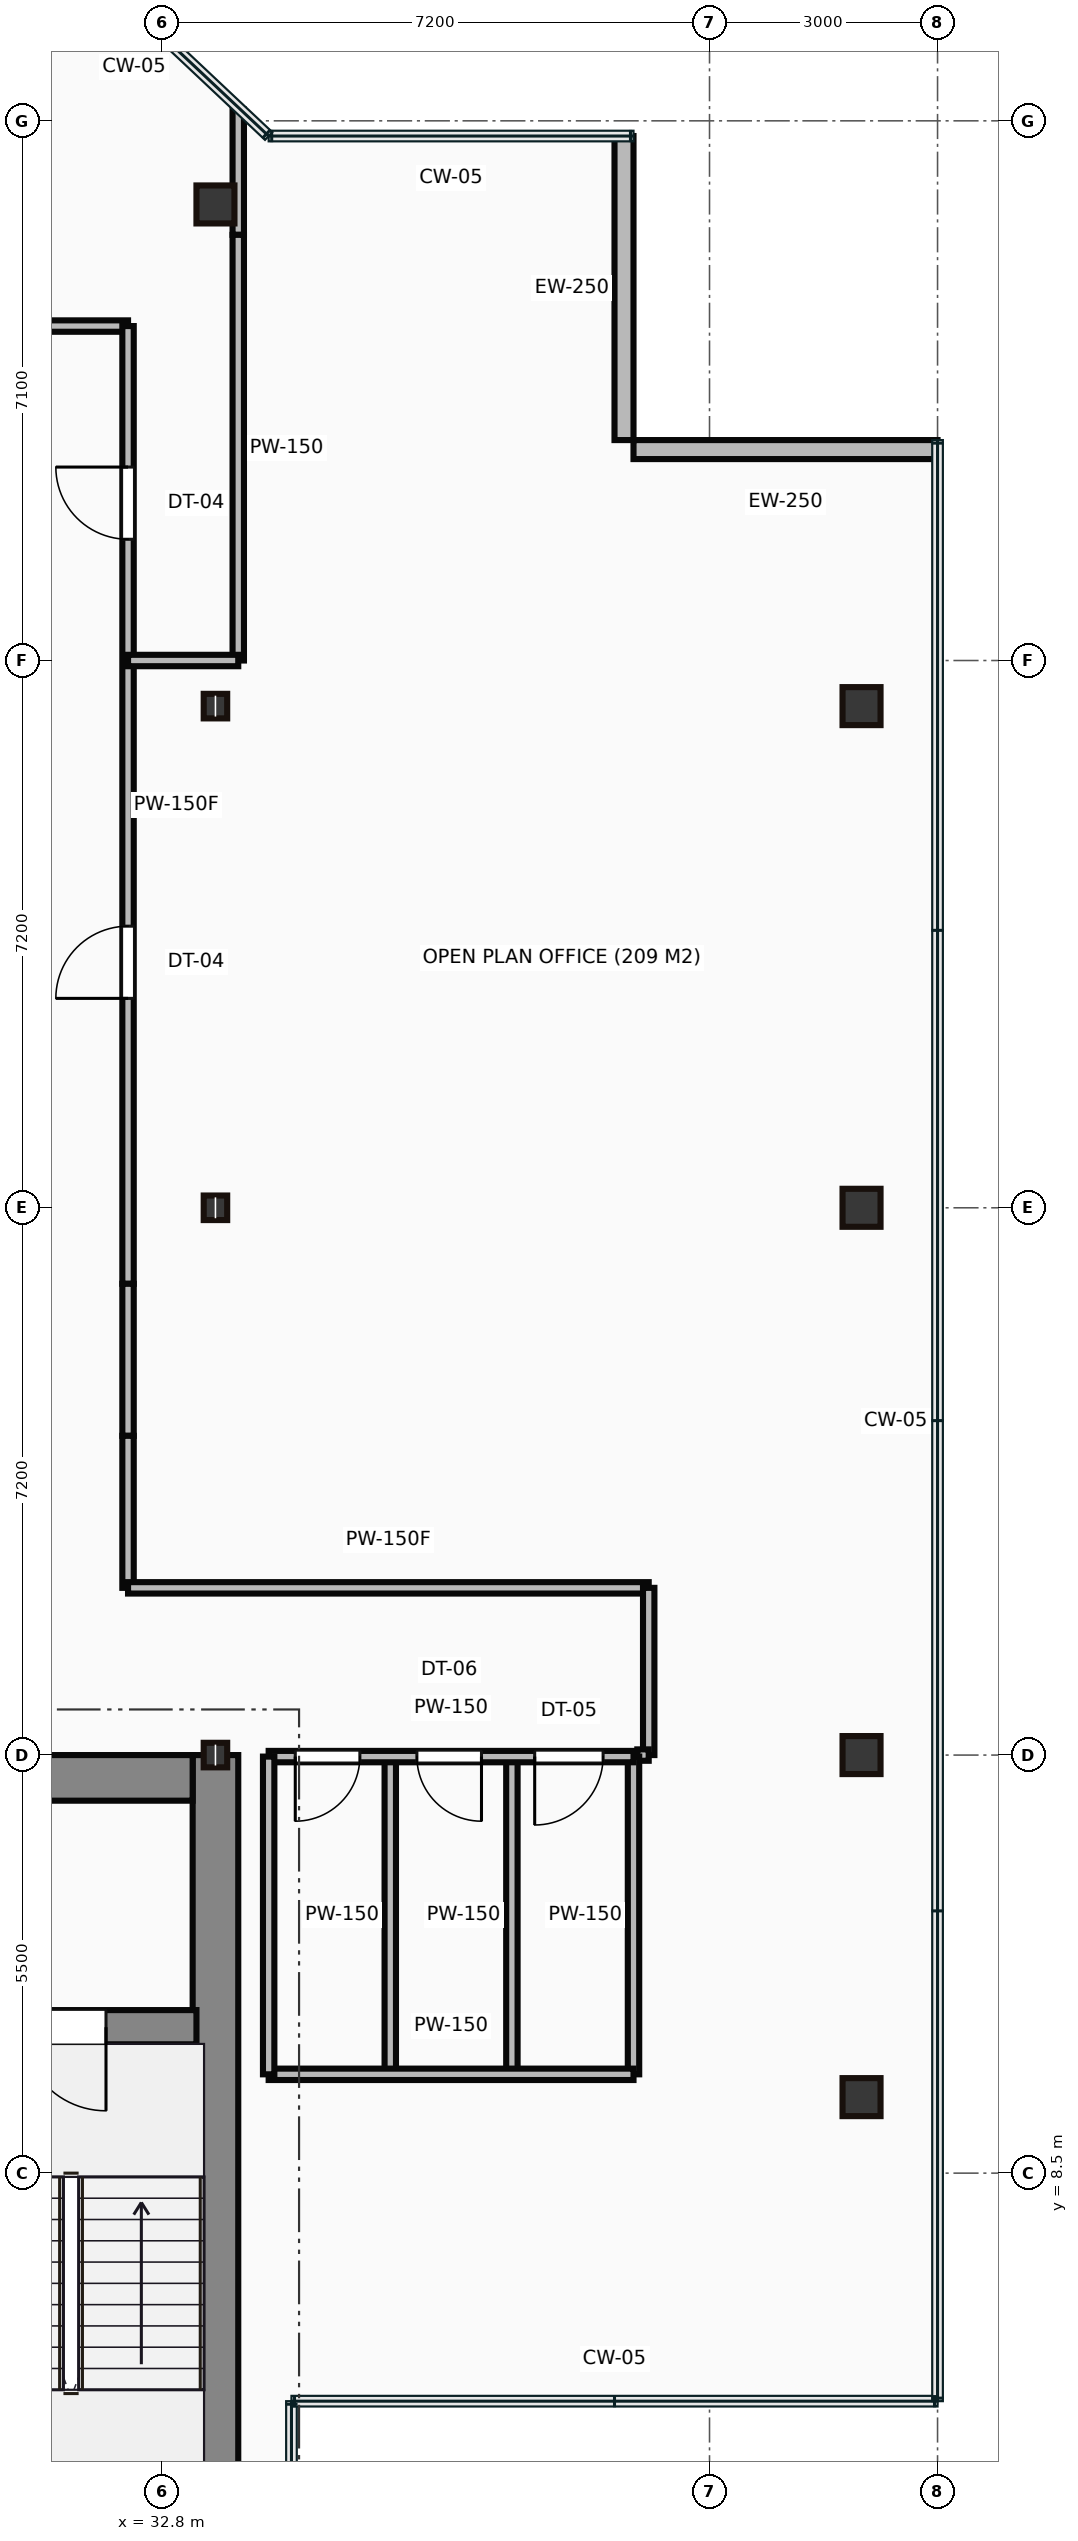
"""IFC4 building model, lengths in metres.
Left out: names, types, materials, properties, quantities, classifications, styles, units other than length and angle.
Written with IfcOpenShell. Run it as: python <this file> out.ifc"""

import sys

from ifc_helpers import new_model, si_unit, direction, frame, frame_2d, origin, origin_2d, place, context, subcontext, project, spatial, rectangle, hollow_rectangle, i_section, extrude, source, transform, mapped, element, fill, save


model = new_model("IFC4")
c1 = context("Model", 3, precision=1e-05, world=origin(), true_north=direction((0.0, 1.0)))
c2 = subcontext(c1, "Body", "Model", "MODEL_VIEW")
j1 = project(units=[si_unit("LENGTHUNIT", "METRE"), si_unit("PLANEANGLEUNIT", "RADIAN")], contexts=[c1])
p1 = place(None, origin())
s1 = spatial("IfcSite", under=j1, at=p1, CompositionType="ELEMENT")
p2 = place(p1, origin())
s2 = spatial("IfcBuilding", under=s1, at=p2, CompositionType="ELEMENT")
p3 = place(p2, frame((0.0, 0.0, 240.55)))
s3 = spatial("IfcBuildingStorey", under=s2, at=p3, CompositionType="ELEMENT", Elevation=240.55)
m1 = source(origin(), c2, "Body", "SweptSolid", [
    extrude(rectangle(XDim=13.1, YDim=0.6, at=frame_2d((6.55, 0.0))), origin(), (0.0, 0.0, 1.0), 3.65),
])
p4 = place(p3, frame((33.5, 0.9, 0.0), z_axis=(0.0, 0.0, 1.0), x_axis=(0.0, 1.0, 0.0)))
e1 = element("IfcWall", 1, at=p4, inside=s3, PredefinedType="SHEAR", context=c2, shape_type="MappedRepresentation", body=[
    mapped(m1, transform((0.0, 0.0, 0.0))),
])
m2 = source(origin(), c2, "Body", "SweptSolid", [
    extrude(rectangle(XDim=12.6, YDim=0.6, at=frame_2d((6.3, 0.0))), origin(), (0.0, 0.0, 1.0), 3.65),
])
p5 = place(p3, frame((20.6, 13.7, 0.0), z_axis=(0.0, 0.0, 1.0), x_axis=(1.0, 0.0, 0.0)))
e2 = element("IfcWall", 2, at=p5, inside=s3, PredefinedType="SHEAR", context=c2, shape_type="MappedRepresentation", body=[
    mapped(m2, transform((0.0, 0.0, 0.0))),
])
p6 = place(p5, frame((9.25, 0.0, 0.0)))
e3 = element("IfcOpeningElement", 3, at=p6, cuts=e2, PredefinedType="OPENING", context=c2, shape_type="SweptSolid", body=[
    extrude(rectangle(XDim=1.1, YDim=2.15, at=frame_2d((0.55, 1.075))), frame((0.0, 0.31, 0.0), z_axis=(0.0, -1.0, 0.0), x_axis=(1.0, 0.0, 0.0)), (0.0, 0.0, 1.0), 0.62),
])
m3 = source(origin(), c2, "Body", "SweptSolid", [
    extrude(rectangle(XDim=3.39, YDim=0.45, at=frame_2d((1.695, 0.0))), origin(), (0.0, 0.0, 1.0), 3.65),
])
p7 = place(p3, frame((29.86, 10.42, 0.0), z_axis=(0.0, 0.0, 1.0), x_axis=(1.0, 0.0, 0.0)))
e4 = element("IfcWall", 4, at=p7, inside=s3, PredefinedType="SHEAR", context=c2, shape_type="MappedRepresentation", body=[
    mapped(m3, transform((0.0, 0.0, 0.0))),
])
p8 = place(p7, frame((1.1, 0.0, 0.0)))
e5 = element("IfcOpeningElement", 5, at=p8, cuts=e4, PredefinedType="OPENING", context=c2, shape_type="SweptSolid", body=[
    extrude(rectangle(XDim=1.1, YDim=2.15, at=frame_2d((0.55, 1.075))), frame((0.0, 0.235, 0.0), z_axis=(0.0, -1.0, 0.0), x_axis=(1.0, 0.0, 0.0)), (0.0, 0.0, 1.0), 0.47),
])
m4 = source(origin(), c2, "Body", "SweptSolid", [
    extrude(i_section(OverallWidth=0.309, OverallDepth=0.323, WebThickness=0.014, FlangeThickness=0.023, at=origin_2d()), origin(), (0.0, 0.0, 1.0), 3.65),
])
for number, where, z_axis, x_axis in (
    (6, (33.5, 14.0, 0.0), (0.0, 0.0, 1.0), (1.0, 0.0, 0.0)),
    (7, (33.5, 21.2, 0.0), (0.0, 0.0, 1.0), (1.0, 0.0, 0.0)),
    (8, (33.5, 27.8, 0.0), (0.0, 0.0, 1.0), (1.0, 0.0, 0.0)),
):
    element("IfcColumn", number, at=place(p3, frame(where, z_axis=z_axis, x_axis=x_axis)), inside=s3, PredefinedType="COLUMN", context=c2, shape_type="MappedRepresentation", body=[
        mapped(m4, transform((0.0, 0.0, 0.0))),
    ])
m5 = source(origin(), c2, "Body", "SweptSolid", [
    extrude(hollow_rectangle(XDim=0.5, YDim=0.5, WallThickness=0.022, at=origin_2d()), origin(), (0.0, 0.0, 1.0), 3.65),
])
for number, where, z_axis, x_axis in (
    (9, (33.5, 34.4, 0.0), (0.0, 0.0, 1.0), (1.0, 0.0, 0.0)),
    (10, (42.0, 9.5, 0.0), (0.0, 0.0, 1.0), (1.0, 0.0, 0.0)),
    (11, (42.0, 14.0, 0.0), (0.0, 0.0, 1.0), (1.0, 0.0, 0.0)),
    (12, (42.0, 21.2, 0.0), (0.0, 0.0, 1.0), (1.0, 0.0, 0.0)),
    (13, (42.0, 27.8, 0.0), (0.0, 0.0, 1.0), (1.0, 0.0, 0.0)),
):
    element("IfcColumn", number, at=place(p3, frame(where, z_axis=z_axis, x_axis=x_axis)), inside=s3, PredefinedType="COLUMN", context=c2, shape_type="MappedRepresentation", body=[
        mapped(m5, transform((0.0, 0.0, 0.0))),
    ])
m6 = source(origin(), c2, "Body", "SweptSolid", [
    extrude(rectangle(XDim=4.0, YDim=0.25, at=frame_2d((2.0, 0.0))), origin(), (0.0, 0.0, 1.0), 3.4),
])
for number, where, z_axis, x_axis in (
    (14, (43.0, 31.175, 0.0), (0.0, 0.0, 1.0), (-1.0, 0.0, 0.0)),
    (15, (38.875, 31.3, 0.0), (0.0, 0.0, 1.0), (0.0, 1.0, 0.0)),
):
    element("IfcWall", number, at=place(p3, frame(where, z_axis=z_axis, x_axis=x_axis)), inside=s3, PredefinedType="STANDARD", context=c2, shape_type="MappedRepresentation", body=[
        mapped(m6, transform((0.0, 0.0, 0.0))),
    ])
m7 = source(origin(), c2, "Body", "SweptSolid", [
    extrude(rectangle(XDim=4.8, YDim=0.15, at=frame_2d((2.4, 0.0))), origin(), (0.0, 0.0, 1.0), 2.787),
])
p9 = place(p3, frame((34.2, 13.98, 0.0), z_axis=(0.0, 0.0, 1.0), x_axis=(1.0, 0.0, 0.0)))
e16 = element("IfcWall", 16, at=p9, inside=s3, PredefinedType="PARTITIONING", context=c2, shape_type="MappedRepresentation", body=[
    mapped(m7, transform((0.0, 0.0, 0.0))),
])
p10 = place(p9, frame((0.35, 0.0, 0.0)))
e17 = element("IfcOpeningElement", 17, at=p10, cuts=e16, PredefinedType="OPENING", context=c2, shape_type="SweptSolid", body=[
    extrude(rectangle(XDim=0.85, YDim=2.1, at=frame_2d((0.425, 1.05))), frame((0.0, 0.085, 0.0), z_axis=(0.0, -1.0, 0.0), x_axis=(1.0, 0.0, 0.0)), (0.0, 0.0, 1.0), 0.17),
])
p11 = place(p9, frame((1.95, 0.0, 0.0)))
e18 = element("IfcOpeningElement", 18, at=p11, cuts=e16, PredefinedType="OPENING", context=c2, shape_type="SweptSolid", body=[
    extrude(rectangle(XDim=0.85, YDim=2.1, at=frame_2d((0.425, 1.05))), frame((0.0, 0.085, 0.0), z_axis=(0.0, -1.0, 0.0), x_axis=(1.0, 0.0, 0.0)), (0.0, 0.0, 1.0), 0.17),
])
p12 = place(p9, frame((3.5, 0.0, 0.0)))
e19 = element("IfcOpeningElement", 19, at=p12, cuts=e16, PredefinedType="OPENING", context=c2, shape_type="SweptSolid", body=[
    extrude(rectangle(XDim=0.9, YDim=2.1, at=frame_2d((0.45, 1.05))), frame((0.0, 0.085, 0.0), z_axis=(0.0, -1.0, 0.0), x_axis=(1.0, 0.0, 0.0)), (0.0, 0.0, 1.0), 0.17),
])
m8 = source(origin(), c2, "Body", "SweptSolid", [
    extrude(rectangle(XDim=4.8, YDim=0.15, at=frame_2d((2.4, 0.0))), origin(), (0.0, 0.0, 1.0), 3.4),
])
p13 = place(p3, frame((34.2, 9.8, 0.0), z_axis=(0.0, 0.0, 1.0), x_axis=(1.0, 0.0, 0.0)))
e20 = element("IfcWall", 20, at=p13, inside=s3, PredefinedType="PARTITIONING", context=c2, shape_type="MappedRepresentation", body=[
    mapped(m8, transform((0.0, 0.0, 0.0))),
])
m9 = source(origin(), c2, "Body", "SweptSolid", [
    extrude(rectangle(XDim=4.18, YDim=0.15, at=frame_2d((2.09, 0.0))), origin(), (0.0, 0.0, 1.0), 3.4),
])
for number, where, z_axis, x_axis in (
    (21, (39.0, 9.8, 0.0), (0.0, 0.0, 1.0), (0.0, 1.0, 0.0)),
    (22, (34.2, 9.8, 0.0), (0.0, 0.0, 1.0), (0.0, 1.0, 0.0)),
    (23, (35.8, 9.8, 0.0), (0.0, 0.0, 1.0), (0.0, 1.0, 0.0)),
    (24, (37.4, 9.8, 0.0), (0.0, 0.0, 1.0), (0.0, 1.0, 0.0)),
):
    element("IfcWall", number, at=place(p3, frame(where, z_axis=z_axis, x_axis=x_axis)), inside=s3, PredefinedType="PARTITIONING", context=c2, shape_type="MappedRepresentation", body=[
        mapped(m9, transform((0.0, 0.0, 0.0))),
    ])
m10 = source(origin(), c2, "Body", "SweptSolid", [
    extrude(rectangle(XDim=2.15, YDim=0.15, at=frame_2d((1.075, 0.0))), origin(), (0.0, 0.0, 1.0), 3.4),
])
p14 = place(p3, frame((30.2, 32.8, 0.0), z_axis=(0.0, 0.0, 1.0), x_axis=(1.0, 0.0, 0.0)))
e25 = element("IfcWall", 25, at=p14, inside=s3, PredefinedType="PARTITIONING", context=c2, shape_type="MappedRepresentation", body=[
    mapped(m10, transform((0.0, 0.0, 0.0))),
])
m11 = source(origin(), c2, "Body", "SweptSolid", [
    extrude(rectangle(XDim=12.6, YDim=0.15, at=frame_2d((6.3, 0.0))), origin(), (0.0, 0.0, 1.0), 3.4),
])
p15 = place(p3, frame((32.35, 32.8, 0.0), z_axis=(0.0, 0.0, 1.0), x_axis=(0.0, -1.0, 0.0)))
e26 = element("IfcWall", 26, at=p15, inside=s3, PredefinedType="PARTITIONING", context=c2, shape_type="MappedRepresentation", body=[
    mapped(m11, transform((0.0, 0.0, 0.0))),
])
p16 = place(p15, frame((1.855, 0.0, 0.0)))
e27 = element("IfcOpeningElement", 27, at=p16, cuts=e26, PredefinedType="OPENING", context=c2, shape_type="SweptSolid", body=[
    extrude(rectangle(XDim=0.95, YDim=2.15, at=frame_2d((0.475, 1.075))), frame((0.0, 0.085, 0.0), z_axis=(0.0, -1.0, 0.0), x_axis=(1.0, 0.0, 0.0)), (0.0, 0.0, 1.0), 0.17),
])
p17 = place(p15, frame((7.895, 0.0, 0.0)))
e28 = element("IfcOpeningElement", 28, at=p17, cuts=e26, PredefinedType="OPENING", context=c2, shape_type="SweptSolid", body=[
    extrude(rectangle(XDim=0.95, YDim=2.15, at=frame_2d((0.475, 1.075))), frame((0.0, 0.085, 0.0), z_axis=(0.0, -1.0, 0.0), x_axis=(1.0, 0.0, 0.0)), (0.0, 0.0, 1.0), 0.17),
])
m12 = source(origin(), c2, "Body", "SweptSolid", [
    extrude(rectangle(XDim=2.0, YDim=0.15, at=frame_2d((1.0, 0.0))), origin(), (0.0, 0.0, 1.0), 3.4),
])
for number, where, z_axis, x_axis in (
    (29, (32.35, 20.2, 0.0), (0.0, 0.0, 1.0), (0.0, -1.0, 0.0)),
    (30, (32.35, 18.2, 0.0), (0.0, 0.0, 1.0), (0.0, -1.0, 0.0)),
):
    element("IfcWall", number, at=place(p3, frame(where, z_axis=z_axis, x_axis=x_axis)), inside=s3, PredefinedType="PARTITIONING", context=c2, shape_type="MappedRepresentation", body=[
        mapped(m12, transform((0.0, 0.0, 0.0))),
    ])
m13 = source(origin(), c2, "Body", "SweptSolid", [
    extrude(rectangle(XDim=6.85, YDim=0.15, at=frame_2d((3.425, 0.0))), origin(), (0.0, 0.0, 1.0), 3.4),
])
p18 = place(p3, frame((32.35, 16.2, 0.0), z_axis=(0.0, 0.0, 1.0), x_axis=(1.0, 0.0, 0.0)))
e31 = element("IfcWall", 31, at=p18, inside=s3, PredefinedType="PARTITIONING", context=c2, shape_type="MappedRepresentation", body=[
    mapped(m13, transform((0.0, 0.0, 0.0))),
])
m14 = source(origin(), c2, "Body", "SweptSolid", [
    extrude(rectangle(XDim=2.2, YDim=0.15, at=frame_2d((1.1, 0.0))), origin(), (0.0, 0.0, 1.0), 3.4),
])
p19 = place(p3, frame((39.2, 16.2, 0.0), z_axis=(0.0, 0.0, 1.0), x_axis=(0.0, -1.0, 0.0)))
e32 = element("IfcWall", 32, at=p19, inside=s3, PredefinedType="PARTITIONING", context=c2, shape_type="MappedRepresentation", body=[
    mapped(m14, transform((0.0, 0.0, 0.0))),
])
m15 = source(origin(), c2, "Body", "SweptSolid", [
    extrude(rectangle(XDim=0.15, YDim=0.15, at=frame_2d((0.075, 0.0))), origin(), (0.0, 0.0, 1.0), 3.4),
])
p20 = place(p3, frame((39.2, 14.0, 0.0), z_axis=(0.0, 0.0, 1.0), x_axis=(-1.0, 0.0, 0.0)))
e33 = element("IfcWall", 33, at=p20, inside=s3, PredefinedType="PARTITIONING", context=c2, shape_type="MappedRepresentation", body=[
    mapped(m15, transform((0.0, 0.0, 0.0))),
])
m16 = source(origin(), c2, "Body", "SweptSolid", [
    extrude(rectangle(XDim=1.649, YDim=0.15, at=frame_2d((0.825, 0.0))), origin(), (0.0, 0.0, 1.0), 3.4),
])
p21 = place(p3, frame((33.8, 35.649, 0.0), z_axis=(0.0, 0.0, 1.0), x_axis=(0.0, -1.0, 0.0)))
e34 = element("IfcWall", 34, at=p21, inside=s3, PredefinedType="PARTITIONING", context=c2, shape_type="MappedRepresentation", body=[
    mapped(m16, transform((0.0, 0.0, 0.0))),
])
m17 = source(origin(), c2, "Body", "SweptSolid", [
    extrude(rectangle(XDim=5.6, YDim=0.15, at=frame_2d((2.8, 0.0))), origin(), (0.0, 0.0, 1.0), 3.4),
])
p22 = place(p3, frame((33.8, 34.0, 0.0), z_axis=(0.0, 0.0, 1.0), x_axis=(0.0, -1.0, 0.0)))
e35 = element("IfcWall", 35, at=p22, inside=s3, PredefinedType="PARTITIONING", context=c2, shape_type="MappedRepresentation", body=[
    mapped(m17, transform((0.0, 0.0, 0.0))),
])
m18 = source(origin(), c2, "Body", "SweptSolid", [
    extrude(rectangle(XDim=1.45, YDim=0.15, at=frame_2d((0.725, 0.0))), origin(), (0.0, 0.0, 1.0), 3.4),
])
p23 = place(p3, frame((33.8, 28.4, 0.0), z_axis=(0.0, 0.0, 1.0), x_axis=(-1.0, 0.0, 0.0)))
e36 = element("IfcWall", 36, at=p23, inside=s3, PredefinedType="PARTITIONING", context=c2, shape_type="MappedRepresentation", body=[
    mapped(m18, transform((0.0, 0.0, 0.0))),
])
m19 = source(origin(), c2, "Body", "SweptSolid", [
    extrude(rectangle(XDim=1.1, YDim=2.15, at=frame_2d((0.55, 1.075))), frame((0.0, 0.025, 0.0), z_axis=(0.0, -1.0, 0.0), x_axis=(1.0, 0.0, 0.0)), (0.0, 0.0, 1.0), 0.05),
])
p24 = place(p8, frame((1.1, 0.0, 0.0), z_axis=(0.0, 0.0, 1.0), x_axis=(-1.0, 0.0, 0.0)))
e37 = element("IfcDoor", 37, at=p24, inside=s3, OperationType="SINGLE_SWING_RIGHT", PredefinedType="DOOR", context=c2, shape_type="MappedRepresentation", body=[
    mapped(m19, transform((0.0, 0.0, 0.0))),
])
fill(e5, e37)
m20 = source(origin(), c2, "Body", "SweptSolid", [
    extrude(rectangle(XDim=0.85, YDim=2.1, at=frame_2d((0.425, 1.05))), frame((0.0, 0.025, 0.0), z_axis=(0.0, -1.0, 0.0), x_axis=(1.0, 0.0, 0.0)), (0.0, 0.0, 1.0), 0.05),
])
p25 = place(p10, frame((0.85, 0.0, 0.0), z_axis=(0.0, 0.0, 1.0), x_axis=(-1.0, 0.0, 0.0)))
e38 = element("IfcDoor", 38, at=p25, inside=s3, OperationType="SINGLE_SWING_LEFT", PredefinedType="DOOR", context=c2, shape_type="MappedRepresentation", body=[
    mapped(m20, transform((0.0, 0.0, 0.0))),
])
fill(e17, e38)
p26 = place(p11, frame((0.85, 0.0, 0.0), z_axis=(0.0, 0.0, 1.0), x_axis=(-1.0, 0.0, 0.0)))
e39 = element("IfcDoor", 39, at=p26, inside=s3, OperationType="SINGLE_SWING_RIGHT", PredefinedType="DOOR", context=c2, shape_type="MappedRepresentation", body=[
    mapped(m20, transform((0.0, 0.0, 0.0))),
])
fill(e18, e39)
m21 = source(origin(), c2, "Body", "SweptSolid", [
    extrude(rectangle(XDim=0.9, YDim=2.1, at=frame_2d((0.45, 1.05))), frame((0.0, 0.025, 0.0), z_axis=(0.0, -1.0, 0.0), x_axis=(1.0, 0.0, 0.0)), (0.0, 0.0, 1.0), 0.05),
])
p27 = place(p12, frame((0.9, 0.0, 0.0), z_axis=(0.0, 0.0, 1.0), x_axis=(-1.0, 0.0, 0.0)))
e40 = element("IfcDoor", 40, at=p27, inside=s3, OperationType="SINGLE_SWING_LEFT", PredefinedType="DOOR", context=c2, shape_type="MappedRepresentation", body=[
    mapped(m21, transform((0.0, 0.0, 0.0))),
])
fill(e19, e40)
m22 = source(origin(), c2, "Body", "SweptSolid", [
    extrude(rectangle(XDim=0.95, YDim=2.15, at=frame_2d((0.475, 1.075))), frame((0.0, 0.025, 0.0), z_axis=(0.0, -1.0, 0.0), x_axis=(1.0, 0.0, 0.0)), (0.0, 0.0, 1.0), 0.05),
])
p28 = place(p16, origin())
e41 = element("IfcDoor", 41, at=p28, inside=s3, OperationType="SINGLE_SWING_LEFT", PredefinedType="DOOR", context=c2, shape_type="MappedRepresentation", body=[
    mapped(m22, transform((0.0, 0.0, 0.0))),
])
fill(e27, e41)
p29 = place(p17, origin())
e42 = element("IfcDoor", 42, at=p29, inside=s3, OperationType="SINGLE_SWING_RIGHT", PredefinedType="DOOR", context=c2, shape_type="MappedRepresentation", body=[
    mapped(m22, transform((0.0, 0.0, 0.0))),
])
fill(e28, e42)
save(model, sys.argv[1])
